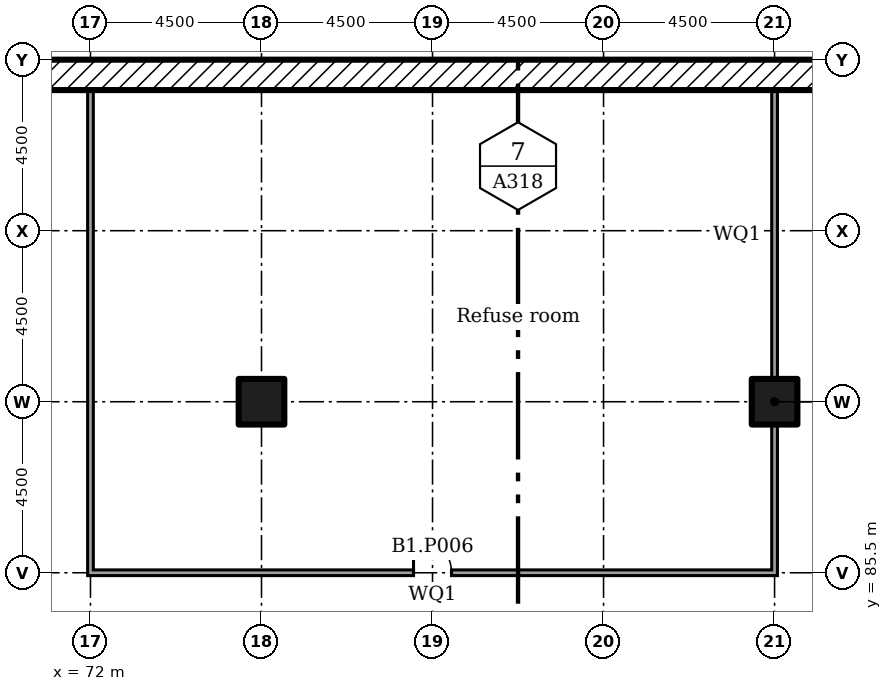
"""IFC4 building model, lengths in metres.
Left out: names, types, materials, properties, quantities, classifications, styles, units other than length and angle.
Written with IfcOpenShell. Run it as: python <this file> out.ifc"""

import sys

from ifc_helpers import new_model, si_unit, direction, frame, frame_2d, origin, origin_2d, place, context, subcontext, project, spatial, rectangle, extrude, element, fill, save


model = new_model("IFC4")
c1 = context("Model", 3, precision=1e-05, world=origin(), true_north=direction((0.0, 1.0)))
c2 = subcontext(c1, "Body", "Model", "MODEL_VIEW")
j1 = project(units=[si_unit("LENGTHUNIT", "METRE"), si_unit("PLANEANGLEUNIT", "RADIAN")], contexts=[c1])
p1 = place(None, origin())
s1 = spatial("IfcSite", under=j1, at=p1, CompositionType="ELEMENT")
p2 = place(p1, origin())
s2 = spatial("IfcBuilding", under=s1, at=p2, CompositionType="ELEMENT")
p3 = place(p2, frame((0.0, 0.0, -4.0)))
s3 = spatial("IfcBuildingStorey", under=s2, at=p3, CompositionType="ELEMENT", Elevation=-4.0)
for number, where in (
    (1, (76.5, 90.0, 0.0)),
    (2, (90.0, 90.0, 0.0)),
):
    element("IfcColumn", number, at=place(p3, frame(where)), inside=s3, PredefinedType="COLUMN", context=c2, shape_type="SweptSolid", body=[
        extrude(rectangle(XDim=1.2, YDim=1.2, at=origin_2d()), origin(), (0.0, 0.0, 1.0), 4.0),
    ])
p4 = place(p3, frame((0.0, 98.6, 0.0)))
e3 = element("IfcWall", 3, at=p4, inside=s3, PredefinedType="SOLIDWALL", context=c2, shape_type="SweptSolid", body=[
    extrude(rectangle(XDim=153.0, YDim=0.8, at=frame_2d((76.5, 0.0))), origin(), (0.0, 0.0, 1.0), 4.0),
])
p5 = place(p3, frame((72.0, 85.425, 0.0), z_axis=(0.0, 0.0, 1.0), x_axis=(0.0, 1.0, 0.0)))
e4 = element("IfcWall", 4, at=p5, inside=s3, PredefinedType="PARTITIONING", context=c2, shape_type="SweptSolid", body=[
    extrude(rectangle(XDim=12.775, YDim=0.15, at=frame_2d((6.387, 0.0))), origin(), (0.0, 0.0, 1.0), 3.55),
])
p6 = place(p3, frame((90.0, 85.425, 0.0), z_axis=(0.0, 0.0, 1.0), x_axis=(0.0, 1.0, 0.0)))
e5 = element("IfcWall", 5, at=p6, inside=s3, PredefinedType="PARTITIONING", context=c2, shape_type="SweptSolid", body=[
    extrude(rectangle(XDim=3.98, YDim=0.15, at=frame_2d((1.99, 0.0))), origin(), (0.0, 0.0, 1.0), 3.55),
])
p7 = place(p3, frame((90.0, 90.595, 0.0), z_axis=(0.0, 0.0, 1.0), x_axis=(0.0, 1.0, 0.0)))
e6 = element("IfcWall", 6, at=p7, inside=s3, PredefinedType="PARTITIONING", context=c2, shape_type="SweptSolid", body=[
    extrude(rectangle(XDim=7.605, YDim=0.15, at=frame_2d((3.802, 0.0))), origin(), (0.0, 0.0, 1.0), 3.55),
])
p8 = place(p3, frame((72.075, 85.5, 0.0)))
e7 = element("IfcWall", 7, at=p8, inside=s3, PredefinedType="PARTITIONING", context=c2, shape_type="SweptSolid", body=[
    extrude(rectangle(XDim=17.85, YDim=0.15, at=frame_2d((8.925, 0.0))), origin(), (0.0, 0.0, 1.0), 3.55),
])
p9 = place(p8, frame((8.425, 0.0, 0.0)))
e8 = element("IfcOpeningElement", 8, at=p9, cuts=e7, PredefinedType="OPENING", context=c2, shape_type="SweptSolid", body=[
    extrude(rectangle(XDim=1.0, YDim=2.1, at=frame_2d((0.5, 1.05))), frame((0.0, 0.085, 0.0), z_axis=(0.0, -1.0, 0.0), x_axis=(1.0, 0.0, 0.0)), (0.0, 0.0, 1.0), 0.17),
])
p10 = place(p9, origin())
e9 = element("IfcDoor", 9, at=p10, inside=s3, OperationType="SINGLE_SWING_RIGHT", PredefinedType="DOOR", context=c2, shape_type="SweptSolid", body=[
    extrude(rectangle(XDim=1.0, YDim=2.1, at=frame_2d((0.5, 1.05))), frame((0.0, 0.025, 0.0), z_axis=(0.0, -1.0, 0.0), x_axis=(1.0, 0.0, 0.0)), (0.0, 0.0, 1.0), 0.05),
])
fill(e8, e9)
save(model, sys.argv[1])
